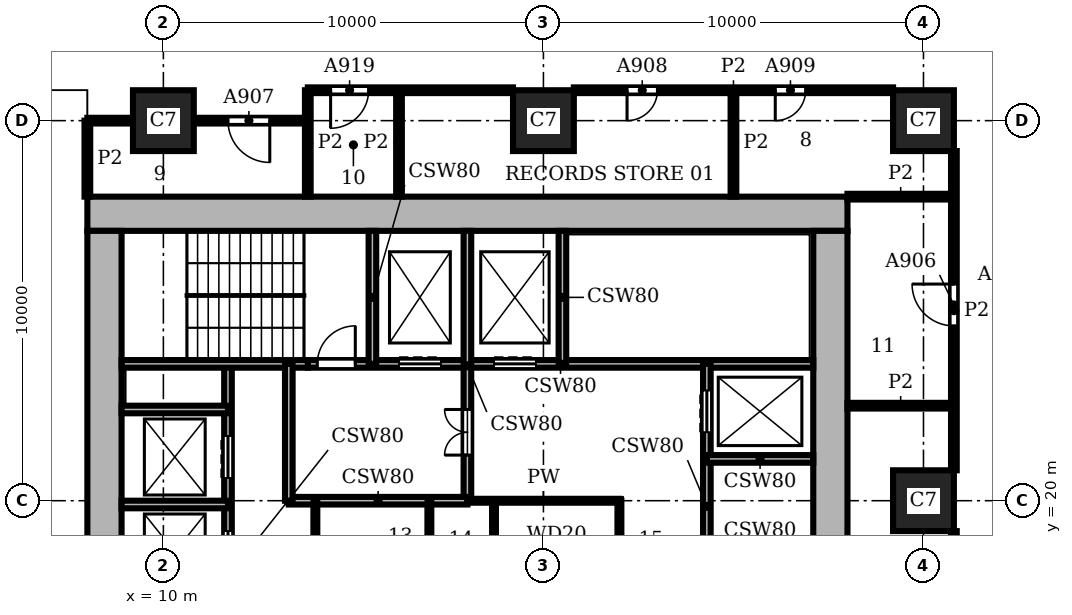
"""IFC4 building model, lengths in metres.
Left out: names, types, materials, properties, quantities, classifications, styles, units other than length and angle.
Written with IfcOpenShell. Run it as: python <this file> out.ifc"""

import sys

from ifc_helpers import new_model, si_unit, direction, frame, frame_2d, origin, origin_2d, place, context, subcontext, project, spatial, rectangle, extrude, element, fill, save


model = new_model("IFC4")
c1 = context("Model", 3, precision=1e-05, world=origin(), true_north=direction((0.0, 1.0)))
c2 = subcontext(c1, "Body", "Model", "MODEL_VIEW")
j1 = project(units=[si_unit("LENGTHUNIT", "METRE"), si_unit("PLANEANGLEUNIT", "RADIAN")], contexts=[c1])
p1 = place(None, origin())
s1 = spatial("IfcSite", under=j1, at=p1, CompositionType="ELEMENT")
p2 = place(p1, origin())
s2 = spatial("IfcBuilding", under=s1, at=p2, CompositionType="ELEMENT")
p3 = place(p2, frame((0.0, 0.0, 113.4)))
s3 = spatial("IfcBuildingStorey", under=s2, at=p3, CompositionType="ELEMENT", Elevation=113.4)
for number, where, z_axis, x_axis in (
    (1, (10.0, 30.0, 0.0), (0.0, 0.0, 1.0), (1.0, 0.0, 0.0)),
    (2, (20.0, 30.0, 0.0), (0.0, 0.0, 1.0), (1.0, 0.0, 0.0)),
    (3, (30.0, 20.0, 0.0), (0.0, 0.0, 1.0), (1.0, 0.0, 0.0)),
    (4, (30.0, 30.0, 0.0), (0.0, 0.0, 1.0), (1.0, 0.0, 0.0)),
):
    element("IfcColumn", number, at=place(p3, frame(where, z_axis=z_axis, x_axis=x_axis)), inside=s3, PredefinedType="COLUMN", context=c2, shape_type="SweptSolid", body=[
        extrude(rectangle(XDim=1.6, YDim=1.6, at=origin_2d()), origin(), (0.0, 0.0, 1.0), 3.9),
    ])
p4 = place(p3, frame((27.55, 8.9, 0.0), z_axis=(0.0, 0.0, 1.0), x_axis=(0.0, 1.0, 0.0)))
e5 = element("IfcWall", 5, at=p4, inside=s3, PredefinedType="SHEAR", context=c2, shape_type="SweptSolid", body=[
    extrude(rectangle(XDim=18.2, YDim=0.9, at=frame_2d((9.1, 0.0))), origin(), (0.0, 0.0, 1.0), 3.9),
])
p5 = place(p4, frame((4.55, 0.0, 0.0)))
e6 = element("IfcOpeningElement", 6, at=p5, cuts=e5, PredefinedType="OPENING", context=c2, shape_type="SweptSolid", body=[
    extrude(rectangle(XDim=1.6, YDim=2.1, at=frame_2d((0.8, 1.05))), frame((0.0, 0.46, 0.0), z_axis=(0.0, -1.0, 0.0), x_axis=(1.0, 0.0, 0.0)), (0.0, 0.0, 1.0), 0.92),
])
p6 = place(p3, frame((28.0, 27.55, 0.0), z_axis=(0.0, 0.0, 1.0), x_axis=(-1.0, 0.0, 0.0)))
e7 = element("IfcWall", 7, at=p6, inside=s3, PredefinedType="SHEAR", context=c2, shape_type="SweptSolid", body=[
    extrude(rectangle(XDim=20.0, YDim=0.9, at=frame_2d((10.0, 0.0))), origin(), (0.0, 0.0, 1.0), 3.9),
])
p7 = place(p3, frame((8.45, 27.1, 0.0), z_axis=(0.0, 0.0, 1.0), x_axis=(0.0, -1.0, 0.0)))
e8 = element("IfcWall", 8, at=p7, inside=s3, PredefinedType="SHEAR", context=c2, shape_type="SweptSolid", body=[
    extrude(rectangle(XDim=18.2, YDim=0.9, at=frame_2d((9.1, 0.0))), origin(), (0.0, 0.0, 1.0), 3.9),
])
p8 = place(p3, frame((8.9, 19.9, 0.0), z_axis=(0.0, 0.0, 1.0), x_axis=(1.0, 0.0, 0.0)))
e9 = element("IfcWall", 9, at=p8, inside=s3, PredefinedType="SHEAR", context=c2, shape_type="SweptSolid", body=[
    extrude(rectangle(XDim=2.8, YDim=0.2, at=frame_2d((1.4, 0.0))), origin(), (0.0, 0.0, 1.0), 3.45),
])
p9 = place(p3, frame((18.0, 20.0, 0.0), z_axis=(0.0, 0.0, 1.0), x_axis=(1.0, 0.0, 0.0)))
e10 = element("IfcWall", 10, at=p9, inside=s3, PredefinedType="PARTITIONING", context=c2, shape_type="SweptSolid", body=[
    extrude(rectangle(XDim=4.0, YDim=0.1, at=frame_2d((2.0, 0.0))), origin(), (0.0, 0.0, 1.0), 3.45),
])
p10 = place(p3, frame((13.3, 20.0, 0.0), z_axis=(0.0, 0.0, 1.0), x_axis=(1.0, 0.0, 0.0)))
e11 = element("IfcWall", 11, at=p10, inside=s3, PredefinedType="SHEAR", context=c2, shape_type="SweptSolid", body=[
    extrude(rectangle(XDim=4.7, YDim=0.2, at=frame_2d((2.35, 0.0))), origin(), (0.0, 0.0, 1.0), 3.45),
])
for number, where, z_axis, x_axis in (
    (12, (24.3, 21.1, 0.0), (0.0, 0.0, 1.0), (1.0, 0.0, 0.0)),
    (13, (8.9, 22.4, 0.0), (0.0, 0.0, 1.0), (1.0, 0.0, 0.0)),
):
    element("IfcWall", number, at=place(p3, frame(where, z_axis=z_axis, x_axis=x_axis)), inside=s3, PredefinedType="SHEAR", context=c2, shape_type="SweptSolid", body=[
        extrude(rectangle(XDim=2.8, YDim=0.2, at=frame_2d((1.4, 0.0))), origin(), (0.0, 0.0, 1.0), 3.45),
    ])
p11 = place(p3, frame((8.9, 23.6, 0.0), z_axis=(0.0, 0.0, 1.0), x_axis=(1.0, 0.0, 0.0)))
e14 = element("IfcWall", 14, at=p11, inside=s3, PredefinedType="SHEAR", context=c2, shape_type="SweptSolid", body=[
    extrude(rectangle(XDim=4.9, YDim=0.2, at=frame_2d((2.45, 0.0))), origin(), (0.0, 0.0, 1.0), 3.45),
])
p12 = place(p3, frame((13.8, 23.6, 0.0), z_axis=(0.0, 0.0, 1.0), x_axis=(1.0, 0.0, 0.0)))
e15 = element("IfcWall", 15, at=p12, inside=s3, PredefinedType="SHEAR", context=c2, shape_type="SweptSolid", body=[
    extrude(rectangle(XDim=13.3, YDim=0.2, at=frame_2d((6.65, 0.0))), origin(), (0.0, 0.0, 1.0), 3.45),
])
p13 = place(p12, frame((2.4, 0.0, 0.0)))
e16 = element("IfcOpeningElement", 16, at=p13, cuts=e15, PredefinedType="OPENING", context=c2, shape_type="SweptSolid", body=[
    extrude(rectangle(XDim=1.1, YDim=2.1, at=frame_2d((0.55, 1.05))), frame((0.0, 0.11, 0.0), z_axis=(0.0, -1.0, 0.0), x_axis=(1.0, 0.0, 0.0)), (0.0, 0.0, 1.0), 0.22),
])
p14 = place(p12, frame((4.9, 0.0, 0.0)))
e17 = element("IfcOpeningElement", 17, at=p14, cuts=e15, PredefinedType="OPENING", context=c2, shape_type="SweptSolid", body=[
    extrude(rectangle(XDim=1.1, YDim=2.1, at=frame_2d((0.55, 1.05))), frame((0.0, 0.11, 0.0), z_axis=(0.0, -1.0, 0.0), x_axis=(1.0, 0.0, 0.0)), (0.0, 0.0, 1.0), 0.22),
])
p15 = place(p12, frame((0.25, 0.0, 0.0)))
e18 = element("IfcOpeningElement", 18, at=p15, cuts=e15, PredefinedType="OPENING", context=c2, shape_type="SweptSolid", body=[
    extrude(rectangle(XDim=1.0, YDim=2.1, at=frame_2d((0.5, 1.05))), frame((0.0, 0.11, 0.0), z_axis=(0.0, -1.0, 0.0), x_axis=(1.0, 0.0, 0.0)), (0.0, 0.0, 1.0), 0.22),
])
p16 = place(p3, frame((11.7, 12.4, 0.0), z_axis=(0.0, 0.0, 1.0), x_axis=(0.0, 1.0, 0.0)))
e19 = element("IfcWall", 19, at=p16, inside=s3, PredefinedType="SHEAR", context=c2, shape_type="SweptSolid", body=[
    extrude(rectangle(XDim=11.2, YDim=0.2, at=frame_2d((5.6, 0.0))), origin(), (0.0, 0.0, 1.0), 3.45),
])
p17 = place(p16, frame((0.7, 0.0, 0.0)))
e20 = element("IfcOpeningElement", 20, at=p17, cuts=e19, PredefinedType="OPENING", context=c2, shape_type="SweptSolid", body=[
    extrude(rectangle(XDim=1.1, YDim=2.1, at=frame_2d((0.55, 1.05))), frame((0.0, 0.11, 0.0), z_axis=(0.0, -1.0, 0.0), x_axis=(1.0, 0.0, 0.0)), (0.0, 0.0, 1.0), 0.22),
])
p18 = place(p16, frame((3.2, 0.0, 0.0)))
e21 = element("IfcOpeningElement", 21, at=p18, cuts=e19, PredefinedType="OPENING", context=c2, shape_type="SweptSolid", body=[
    extrude(rectangle(XDim=1.1, YDim=2.1, at=frame_2d((0.55, 1.05))), frame((0.0, 0.11, 0.0), z_axis=(0.0, -1.0, 0.0), x_axis=(1.0, 0.0, 0.0)), (0.0, 0.0, 1.0), 0.22),
])
p19 = place(p16, frame((5.7, 0.0, 0.0)))
e22 = element("IfcOpeningElement", 22, at=p19, cuts=e19, PredefinedType="OPENING", context=c2, shape_type="SweptSolid", body=[
    extrude(rectangle(XDim=1.1, YDim=2.1, at=frame_2d((0.55, 1.05))), frame((0.0, 0.11, 0.0), z_axis=(0.0, -1.0, 0.0), x_axis=(1.0, 0.0, 0.0)), (0.0, 0.0, 1.0), 0.22),
])
p20 = place(p16, frame((8.2, 0.0, 0.0)))
e23 = element("IfcOpeningElement", 23, at=p20, cuts=e19, PredefinedType="OPENING", context=c2, shape_type="SweptSolid", body=[
    extrude(rectangle(XDim=1.1, YDim=2.1, at=frame_2d((0.55, 1.05))), frame((0.0, 0.11, 0.0), z_axis=(0.0, -1.0, 0.0), x_axis=(1.0, 0.0, 0.0)), (0.0, 0.0, 1.0), 0.22),
])
p21 = place(p3, frame((13.3, 20.0, 0.0), z_axis=(0.0, 0.0, 1.0), x_axis=(0.0, 1.0, 0.0)))
e24 = element("IfcWall", 24, at=p21, inside=s3, PredefinedType="SHEAR", context=c2, shape_type="SweptSolid", body=[
    extrude(rectangle(XDim=3.6, YDim=0.2, at=frame_2d((1.8, 0.0))), origin(), (0.0, 0.0, 1.0), 3.45),
])
p22 = place(p3, frame((14.0, 16.2, 0.0), z_axis=(0.0, 0.0, 1.0), x_axis=(0.0, 1.0, 0.0)))
e25 = element("IfcWall", 25, at=p22, inside=s3, PredefinedType="PARTITIONING", context=c2, shape_type="SweptSolid", body=[
    extrude(rectangle(XDim=3.8, YDim=0.1, at=frame_2d((1.9, 0.0))), origin(), (0.0, 0.0, 1.0), 3.45),
])
p23 = place(p3, frame((15.5, 23.6, 0.0), z_axis=(0.0, 0.0, 1.0), x_axis=(0.0, 1.0, 0.0)))
e26 = element("IfcWall", 26, at=p23, inside=s3, PredefinedType="SHEAR", context=c2, shape_type="SweptSolid", body=[
    extrude(rectangle(XDim=3.5, YDim=0.2, at=frame_2d((1.75, 0.0))), origin(), (0.0, 0.0, 1.0), 3.45),
])
p24 = place(p3, frame((17.0, 17.5, 0.0), z_axis=(0.0, 0.0, 1.0), x_axis=(0.0, 1.0, 0.0)))
e27 = element("IfcWall", 27, at=p24, inside=s3, PredefinedType="PARTITIONING", context=c2, shape_type="SweptSolid", body=[
    extrude(rectangle(XDim=2.5, YDim=0.1, at=frame_2d((1.25, 0.0))), origin(), (0.0, 0.0, 1.0), 3.45),
])
p25 = place(p3, frame((18.0, 20.0, 0.0), z_axis=(0.0, 0.0, 1.0), x_axis=(0.0, 1.0, 0.0)))
e28 = element("IfcWall", 28, at=p25, inside=s3, PredefinedType="SHEAR", context=c2, shape_type="SweptSolid", body=[
    extrude(rectangle(XDim=7.1, YDim=0.2, at=frame_2d((3.55, 0.0))), origin(), (0.0, 0.0, 1.0), 3.45),
])
p26 = place(p25, frame((1.2, 0.0, 0.0)))
e29 = element("IfcOpeningElement", 29, at=p26, cuts=e28, PredefinedType="OPENING", context=c2, shape_type="SweptSolid", body=[
    extrude(rectangle(XDim=1.2, YDim=2.1, at=frame_2d((0.6, 1.05))), frame((0.0, 0.11, 0.0), z_axis=(0.0, -1.0, 0.0), x_axis=(1.0, 0.0, 0.0)), (0.0, 0.0, 1.0), 0.22),
])
p27 = place(p3, frame((18.7, 17.5, 0.0), z_axis=(0.0, 0.0, 1.0), x_axis=(0.0, 1.0, 0.0)))
e30 = element("IfcWall", 30, at=p27, inside=s3, PredefinedType="PARTITIONING", context=c2, shape_type="SweptSolid", body=[
    extrude(rectangle(XDim=2.5, YDim=0.1, at=frame_2d((1.25, 0.0))), origin(), (0.0, 0.0, 1.0), 3.45),
])
p28 = place(p3, frame((20.5, 23.6, 0.0), z_axis=(0.0, 0.0, 1.0), x_axis=(0.0, 1.0, 0.0)))
e31 = element("IfcWall", 31, at=p28, inside=s3, PredefinedType="SHEAR", context=c2, shape_type="SweptSolid", body=[
    extrude(rectangle(XDim=3.5, YDim=0.2, at=frame_2d((1.75, 0.0))), origin(), (0.0, 0.0, 1.0), 3.45),
])
p29 = place(p3, frame((22.0, 16.2, 0.0), z_axis=(0.0, 0.0, 1.0), x_axis=(0.0, 1.0, 0.0)))
e32 = element("IfcWall", 32, at=p29, inside=s3, PredefinedType="PARTITIONING", context=c2, shape_type="SweptSolid", body=[
    extrude(rectangle(XDim=3.8, YDim=0.1, at=frame_2d((1.9, 0.0))), origin(), (0.0, 0.0, 1.0), 3.45),
])
p30 = place(p29, frame((0.1, 0.0, 0.0)))
e33 = element("IfcOpeningElement", 33, at=p30, cuts=e32, PredefinedType="OPENING", context=c2, shape_type="SweptSolid", body=[
    extrude(rectangle(XDim=1.1, YDim=2.1, at=frame_2d((0.55, 1.05))), frame((0.0, 0.06, 0.0), z_axis=(0.0, -1.0, 0.0), x_axis=(1.0, 0.0, 0.0)), (0.0, 0.0, 1.0), 0.12),
])
p31 = place(p3, frame((24.3, 16.1, 0.0), z_axis=(0.0, 0.0, 1.0), x_axis=(0.0, 1.0, 0.0)))
e34 = element("IfcWall", 34, at=p31, inside=s3, PredefinedType="SHEAR", context=c2, shape_type="SweptSolid", body=[
    extrude(rectangle(XDim=7.5, YDim=0.2, at=frame_2d((3.75, 0.0))), origin(), (0.0, 0.0, 1.0), 3.45),
])
p32 = place(p31, frame((5.7, 0.0, 0.0)))
e35 = element("IfcOpeningElement", 35, at=p32, cuts=e34, PredefinedType="OPENING", context=c2, shape_type="SweptSolid", body=[
    extrude(rectangle(XDim=1.1, YDim=2.1, at=frame_2d((0.55, 1.05))), frame((0.0, 0.11, 0.0), z_axis=(0.0, -1.0, 0.0), x_axis=(1.0, 0.0, 0.0)), (0.0, 0.0, 1.0), 0.22),
])
p33 = place(p3, frame((8.0, 28.0, 0.0), z_axis=(0.0, 0.0, 1.0), x_axis=(0.0, 1.0, 0.0)))
e36 = element("IfcWall", 36, at=p33, inside=s3, PredefinedType="PARTITIONING", context=c2, shape_type="SweptSolid", body=[
    extrude(rectangle(XDim=2.0, YDim=0.15, at=frame_2d((1.0, 0.0))), origin(), (0.0, 0.0, 1.0), 3.45),
])
for number, where, z_axis, x_axis in (
    (37, (13.8, 28.0, 0.0), (0.0, 0.0, 1.0), (0.0, 1.0, 0.0)),
    (38, (16.2, 28.0, 0.0), (0.0, 0.0, 1.0), (0.0, 1.0, 0.0)),
    (39, (25.0, 28.0, 0.0), (0.0, 0.0, 1.0), (0.0, 1.0, 0.0)),
):
    element("IfcWall", number, at=place(p3, frame(where, z_axis=z_axis, x_axis=x_axis)), inside=s3, PredefinedType="PARTITIONING", context=c2, shape_type="SweptSolid", body=[
        extrude(rectangle(XDim=2.8, YDim=0.15, at=frame_2d((1.4, 0.0))), origin(), (0.0, 0.0, 1.0), 3.45),
    ])
p34 = place(p3, frame((30.8, 15.45, 0.0), z_axis=(0.0, 0.0, 1.0), x_axis=(0.0, 1.0, 0.0)))
e40 = element("IfcWall", 40, at=p34, inside=s3, PredefinedType="PARTITIONING", context=c2, shape_type="SweptSolid", body=[
    extrude(rectangle(XDim=3.75, YDim=0.15, at=frame_2d((1.875, 0.0))), origin(), (0.0, 0.0, 1.0), 3.45),
])
p35 = place(p34, frame((1.6, 0.0, 0.0)))
e41 = element("IfcOpeningElement", 41, at=p35, cuts=e40, PredefinedType="OPENING", context=c2, shape_type="SweptSolid", body=[
    extrude(rectangle(XDim=0.8, YDim=2.1, at=frame_2d((0.4, 1.05))), frame((0.0, 0.085, 0.0), z_axis=(0.0, -1.0, 0.0), x_axis=(1.0, 0.0, 0.0)), (0.0, 0.0, 1.0), 0.17),
])
p36 = place(p3, frame((30.8, 20.8, 0.0), z_axis=(0.0, 0.0, 1.0), x_axis=(0.0, 1.0, 0.0)))
e42 = element("IfcWall", 42, at=p36, inside=s3, PredefinedType="PARTITIONING", context=c2, shape_type="SweptSolid", body=[
    extrude(rectangle(XDim=8.4, YDim=0.15, at=frame_2d((4.2, 0.0))), origin(), (0.0, 0.0, 1.0), 3.45),
])
p37 = place(p36, frame((3.8, 0.0, 0.0)))
e43 = element("IfcOpeningElement", 43, at=p37, cuts=e42, PredefinedType="OPENING", context=c2, shape_type="SweptSolid", body=[
    extrude(rectangle(XDim=1.1, YDim=2.1, at=frame_2d((0.55, 1.05))), frame((0.0, 0.085, 0.0), z_axis=(0.0, -1.0, 0.0), x_axis=(1.0, 0.0, 0.0)), (0.0, 0.0, 1.0), 0.17),
])
for number, where, z_axis, x_axis in (
    (44, (28.0, 22.5, 0.0), (0.0, 0.0, 1.0), (1.0, 0.0, 0.0)),
    (45, (28.0, 28.0, 0.0), (0.0, 0.0, 1.0), (1.0, 0.0, 0.0)),
):
    element("IfcWall", number, at=place(p3, frame(where, z_axis=z_axis, x_axis=x_axis)), inside=s3, PredefinedType="PARTITIONING", context=c2, shape_type="SweptSolid", body=[
        extrude(rectangle(XDim=2.8, YDim=0.15, at=frame_2d((1.4, 0.0))), origin(), (0.0, 0.0, 1.0), 3.45),
    ])
p38 = place(p3, frame((8.0, 30.0, 0.0), z_axis=(0.0, 0.0, 1.0), x_axis=(1.0, 0.0, 0.0)))
e46 = element("IfcWall", 46, at=p38, inside=s3, PredefinedType="PARTITIONING", context=c2, shape_type="SweptSolid", body=[
    extrude(rectangle(XDim=1.2, YDim=0.15, at=frame_2d((0.6, 0.0))), origin(), (0.0, 0.0, 1.0), 3.45),
])
p39 = place(p3, frame((10.8, 30.0, 0.0), z_axis=(0.0, 0.0, 1.0), x_axis=(1.0, 0.0, 0.0)))
e47 = element("IfcWall", 47, at=p39, inside=s3, PredefinedType="PARTITIONING", context=c2, shape_type="SweptSolid", body=[
    extrude(rectangle(XDim=3.0, YDim=0.15, at=frame_2d((1.5, 0.0))), origin(), (0.0, 0.0, 1.0), 3.45),
])
p40 = place(p39, frame((0.9, 0.0, 0.0)))
e48 = element("IfcOpeningElement", 48, at=p40, cuts=e47, PredefinedType="OPENING", context=c2, shape_type="SweptSolid", body=[
    extrude(rectangle(XDim=1.1, YDim=2.1, at=frame_2d((0.55, 1.05))), frame((0.0, 0.085, 0.0), z_axis=(0.0, -1.0, 0.0), x_axis=(1.0, 0.0, 0.0)), (0.0, 0.0, 1.0), 0.17),
])
p41 = place(p3, frame((13.8, 30.8, 0.0), z_axis=(0.0, 0.0, 1.0), x_axis=(1.0, 0.0, 0.0)))
e49 = element("IfcWall", 49, at=p41, inside=s3, PredefinedType="PARTITIONING", context=c2, shape_type="SweptSolid", body=[
    extrude(rectangle(XDim=5.4, YDim=0.15, at=frame_2d((2.7, 0.0))), origin(), (0.0, 0.0, 1.0), 3.45),
])
p42 = place(p41, frame((0.6, 0.0, 0.0)))
e50 = element("IfcOpeningElement", 50, at=p42, cuts=e49, PredefinedType="OPENING", context=c2, shape_type="SweptSolid", body=[
    extrude(rectangle(XDim=1.0, YDim=2.1, at=frame_2d((0.5, 1.05))), frame((0.0, 0.085, 0.0), z_axis=(0.0, -1.0, 0.0), x_axis=(1.0, 0.0, 0.0)), (0.0, 0.0, 1.0), 0.17),
])
p43 = place(p3, frame((20.8, 30.8, 0.0), z_axis=(0.0, 0.0, 1.0), x_axis=(1.0, 0.0, 0.0)))
e51 = element("IfcWall", 51, at=p43, inside=s3, PredefinedType="PARTITIONING", context=c2, shape_type="SweptSolid", body=[
    extrude(rectangle(XDim=8.4, YDim=0.15, at=frame_2d((4.2, 0.0))), origin(), (0.0, 0.0, 1.0), 3.45),
])
p44 = place(p43, frame((1.4, 0.0, 0.0)))
e52 = element("IfcOpeningElement", 52, at=p44, cuts=e51, PredefinedType="OPENING", context=c2, shape_type="SweptSolid", body=[
    extrude(rectangle(XDim=0.8, YDim=2.1, at=frame_2d((0.4, 1.05))), frame((0.0, 0.085, 0.0), z_axis=(0.0, -1.0, 0.0), x_axis=(1.0, 0.0, 0.0)), (0.0, 0.0, 1.0), 0.17),
])
p45 = place(p43, frame((5.3, 0.0, 0.0)))
e53 = element("IfcOpeningElement", 53, at=p45, cuts=e51, PredefinedType="OPENING", context=c2, shape_type="SweptSolid", body=[
    extrude(rectangle(XDim=0.8, YDim=2.1, at=frame_2d((0.4, 1.05))), frame((0.0, 0.085, 0.0), z_axis=(0.0, -1.0, 0.0), x_axis=(1.0, 0.0, 0.0)), (0.0, 0.0, 1.0), 0.17),
])
p46 = place(p19, origin())
e54 = element("IfcDoor", 54, at=p46, inside=s3, OperationType="DOUBLE_DOOR_SLIDING", PredefinedType="DOOR", context=c2, shape_type="SweptSolid", body=[
    extrude(rectangle(XDim=1.1, YDim=2.1, at=frame_2d((0.55, 1.05))), frame((0.0, 0.025, 0.0), z_axis=(0.0, -1.0, 0.0), x_axis=(1.0, 0.0, 0.0)), (0.0, 0.0, 1.0), 0.05),
])
fill(e22, e54)
p47 = place(p20, origin())
e55 = element("IfcDoor", 55, at=p47, inside=s3, OperationType="DOUBLE_DOOR_SLIDING", PredefinedType="DOOR", context=c2, shape_type="SweptSolid", body=[
    extrude(rectangle(XDim=1.1, YDim=2.1, at=frame_2d((0.55, 1.05))), frame((0.0, 0.025, 0.0), z_axis=(0.0, -1.0, 0.0), x_axis=(1.0, 0.0, 0.0)), (0.0, 0.0, 1.0), 0.05),
])
fill(e23, e55)
p48 = place(p32, origin())
e56 = element("IfcDoor", 56, at=p48, inside=s3, OperationType="DOUBLE_DOOR_SLIDING", PredefinedType="DOOR", context=c2, shape_type="SweptSolid", body=[
    extrude(rectangle(XDim=1.1, YDim=2.1, at=frame_2d((0.55, 1.05))), frame((0.0, 0.025, 0.0), z_axis=(0.0, -1.0, 0.0), x_axis=(1.0, 0.0, 0.0)), (0.0, 0.0, 1.0), 0.05),
])
fill(e35, e56)
p49 = place(p13, origin())
e57 = element("IfcDoor", 57, at=p49, inside=s3, OperationType="DOUBLE_DOOR_SLIDING", PredefinedType="DOOR", context=c2, shape_type="SweptSolid", body=[
    extrude(rectangle(XDim=1.1, YDim=2.1, at=frame_2d((0.55, 1.05))), frame((0.0, 0.025, 0.0), z_axis=(0.0, -1.0, 0.0), x_axis=(1.0, 0.0, 0.0)), (0.0, 0.0, 1.0), 0.05),
])
fill(e16, e57)
p50 = place(p14, origin())
e58 = element("IfcDoor", 58, at=p50, inside=s3, OperationType="DOUBLE_DOOR_SLIDING", PredefinedType="DOOR", context=c2, shape_type="SweptSolid", body=[
    extrude(rectangle(XDim=1.1, YDim=2.1, at=frame_2d((0.55, 1.05))), frame((0.0, 0.025, 0.0), z_axis=(0.0, -1.0, 0.0), x_axis=(1.0, 0.0, 0.0)), (0.0, 0.0, 1.0), 0.05),
])
fill(e17, e58)
p51 = place(p15, origin())
e59 = element("IfcDoor", 59, at=p51, inside=s3, OperationType="SINGLE_SWING_RIGHT", PredefinedType="DOOR", context=c2, shape_type="SweptSolid", body=[
    extrude(rectangle(XDim=1.0, YDim=2.1, at=frame_2d((0.5, 1.05))), frame((0.0, 0.025, 0.0), z_axis=(0.0, -1.0, 0.0), x_axis=(1.0, 0.0, 0.0)), (0.0, 0.0, 1.0), 0.05),
])
fill(e18, e59)
p52 = place(p26, origin())
e60 = element("IfcDoor", 60, at=p52, inside=s3, OperationType="DOUBLE_DOOR_SINGLE_SWING", PredefinedType="DOOR", context=c2, shape_type="SweptSolid", body=[
    extrude(rectangle(XDim=1.2, YDim=2.1, at=frame_2d((0.6, 1.05))), frame((0.0, 0.025, 0.0), z_axis=(0.0, -1.0, 0.0), x_axis=(1.0, 0.0, 0.0)), (0.0, 0.0, 1.0), 0.05),
])
fill(e29, e60)
p53 = place(p37, origin())
e61 = element("IfcDoor", 61, at=p53, inside=s3, OperationType="SINGLE_SWING_RIGHT", PredefinedType="DOOR", context=c2, shape_type="SweptSolid", body=[
    extrude(rectangle(XDim=1.1, YDim=2.1, at=frame_2d((0.55, 1.05))), frame((0.0, 0.025, 0.0), z_axis=(0.0, -1.0, 0.0), x_axis=(1.0, 0.0, 0.0)), (0.0, 0.0, 1.0), 0.05),
])
fill(e43, e61)
p54 = place(p40, frame((1.1, 0.0, 0.0), z_axis=(0.0, 0.0, 1.0), x_axis=(-1.0, 0.0, 0.0)))
e62 = element("IfcDoor", 62, at=p54, inside=s3, OperationType="SINGLE_SWING_LEFT", PredefinedType="DOOR", context=c2, shape_type="SweptSolid", body=[
    extrude(rectangle(XDim=1.1, YDim=2.1, at=frame_2d((0.55, 1.05))), frame((0.0, 0.025, 0.0), z_axis=(0.0, -1.0, 0.0), x_axis=(1.0, 0.0, 0.0)), (0.0, 0.0, 1.0), 0.05),
])
fill(e48, e62)
p55 = place(p44, frame((0.8, 0.0, 0.0), z_axis=(0.0, 0.0, 1.0), x_axis=(-1.0, 0.0, 0.0)))
e63 = element("IfcDoor", 63, at=p55, inside=s3, OperationType="SINGLE_SWING_RIGHT", PredefinedType="DOOR", context=c2, shape_type="SweptSolid", body=[
    extrude(rectangle(XDim=0.8, YDim=2.1, at=frame_2d((0.4, 1.05))), frame((0.0, 0.025, 0.0), z_axis=(0.0, -1.0, 0.0), x_axis=(1.0, 0.0, 0.0)), (0.0, 0.0, 1.0), 0.05),
])
fill(e52, e63)
p56 = place(p45, frame((0.8, 0.0, 0.0), z_axis=(0.0, 0.0, 1.0), x_axis=(-1.0, 0.0, 0.0)))
e64 = element("IfcDoor", 64, at=p56, inside=s3, OperationType="SINGLE_SWING_RIGHT", PredefinedType="DOOR", context=c2, shape_type="SweptSolid", body=[
    extrude(rectangle(XDim=0.8, YDim=2.1, at=frame_2d((0.4, 1.05))), frame((0.0, 0.025, 0.0), z_axis=(0.0, -1.0, 0.0), x_axis=(1.0, 0.0, 0.0)), (0.0, 0.0, 1.0), 0.05),
])
fill(e53, e64)
p57 = place(p42, frame((1.0, 0.0, 0.0), z_axis=(0.0, 0.0, 1.0), x_axis=(-1.0, 0.0, 0.0)))
e65 = element("IfcDoor", 65, at=p57, inside=s3, OperationType="SINGLE_SWING_RIGHT", PredefinedType="DOOR", context=c2, shape_type="SweptSolid", body=[
    extrude(rectangle(XDim=1.0, YDim=2.1, at=frame_2d((0.5, 1.05))), frame((0.0, 0.025, 0.0), z_axis=(0.0, -1.0, 0.0), x_axis=(1.0, 0.0, 0.0)), (0.0, 0.0, 1.0), 0.05),
])
fill(e50, e65)
save(model, sys.argv[1])
